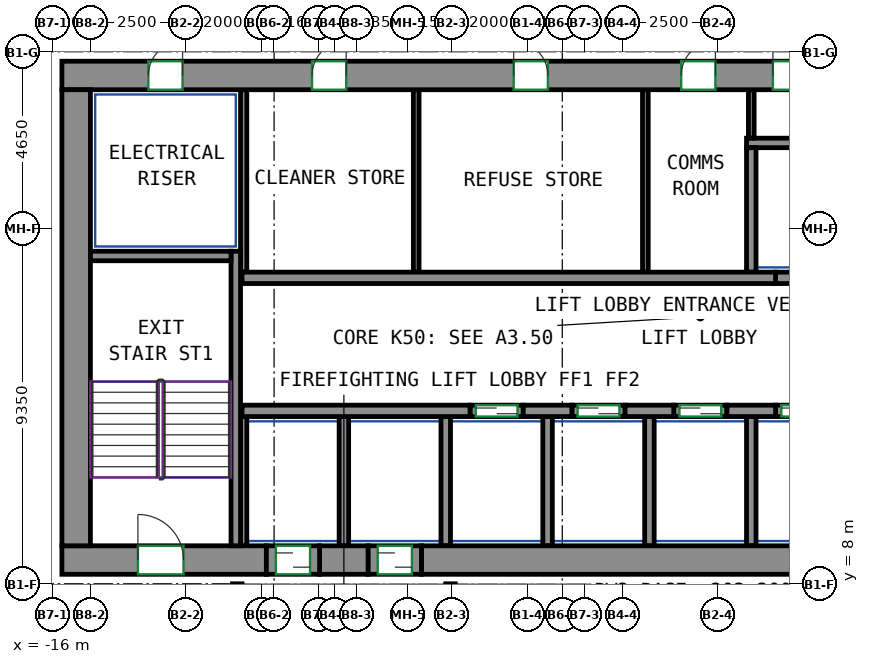
"""IFC4 building model, lengths in metres.
Left out: names, types, materials, properties, quantities, classifications, styles, units other than length and angle.
Written with IfcOpenShell. Run it as: python <this file> out.ifc"""

import sys

from ifc_helpers import new_model, si_unit, direction, frame, frame_2d, origin, place, context, subcontext, project, spatial, rectangle, extrude, source, transform, mapped, element, fill, save


model = new_model("IFC4")
c1 = context("Model", 3, precision=1e-05, world=origin(), true_north=direction((0.0, 1.0)))
c2 = subcontext(c1, "Body", "Model", "MODEL_VIEW")
j1 = project(units=[si_unit("LENGTHUNIT", "METRE"), si_unit("PLANEANGLEUNIT", "RADIAN")], contexts=[c1])
p1 = place(None, origin())
s1 = spatial("IfcSite", under=j1, at=p1, CompositionType="ELEMENT")
p2 = place(p1, origin())
s2 = spatial("IfcBuilding", under=s1, at=p2, CompositionType="ELEMENT")
p3 = place(p2, frame((0.0, 0.0, 203.3)))
s3 = spatial("IfcBuildingStorey", under=s2, at=p3, CompositionType="ELEMENT", Elevation=203.3)
m1 = source(origin(), c2, "Body", "SweptSolid", [
    extrude(rectangle(XDim=5.38, YDim=0.75, at=frame_2d((2.69, 0.0))), origin(), (0.0, 0.0, 1.0), 3.12),
])
p4 = place(p3, frame((-15.75, 8.625, 0.0), z_axis=(0.0, 0.0, 1.0), x_axis=(1.0, 0.0, 0.0)))
e1 = element("IfcWall", 1, at=p4, inside=s3, PredefinedType="SHEAR", context=c2, shape_type="MappedRepresentation", body=[
    mapped(m1, transform((0.0, 0.0, 0.0))),
])
p5 = place(p4, frame((2.0, 0.0, 0.0)))
e2 = element("IfcOpeningElement", 2, at=p5, cuts=e1, PredefinedType="OPENING", context=c2, shape_type="SweptSolid", body=[
    extrude(rectangle(XDim=1.2, YDim=2.1, at=frame_2d((0.6, 1.05))), frame((0.0, 0.385, 0.0), z_axis=(0.0, -1.0, 0.0), x_axis=(1.0, 0.0, 0.0)), (0.0, 0.0, 1.0), 0.77),
])
m2 = source(origin(), c2, "Body", "SweptSolid", [
    extrude(rectangle(XDim=1.28, YDim=0.75, at=frame_2d((0.64, 0.0))), origin(), (0.0, 0.0, 1.0), 3.12),
])
p6 = place(p3, frame((-8.97, 8.625, 0.0), z_axis=(0.0, 0.0, 1.0), x_axis=(1.0, 0.0, 0.0)))
e3 = element("IfcWall", 3, at=p6, inside=s3, PredefinedType="SHEAR", context=c2, shape_type="MappedRepresentation", body=[
    mapped(m2, transform((0.0, 0.0, 0.0))),
])
m3 = source(origin(), c2, "Body", "SweptSolid", [
    extrude(rectangle(XDim=14.18, YDim=0.75, at=frame_2d((7.09, 0.0))), origin(), (0.0, 0.0, 1.0), 3.12),
])
p7 = place(p3, frame((-6.29, 8.625, 0.0), z_axis=(0.0, 0.0, 1.0), x_axis=(1.0, 0.0, 0.0)))
e4 = element("IfcWall", 4, at=p7, inside=s3, PredefinedType="SHEAR", context=c2, shape_type="MappedRepresentation", body=[
    mapped(m3, transform((0.0, 0.0, 0.0))),
])
m4 = source(origin(), c2, "Body", "SweptSolid", [
    extrude(rectangle(XDim=33.6, YDim=0.75, at=frame_2d((16.8, 0.0))), origin(), (0.0, 0.0, 1.0), 3.12),
])
p8 = place(p3, frame((-15.75, 21.375, 0.0), z_axis=(0.0, 0.0, 1.0), x_axis=(1.0, 0.0, 0.0)))
e5 = element("IfcWall", 5, at=p8, inside=s3, PredefinedType="SHEAR", context=c2, shape_type="MappedRepresentation", body=[
    mapped(m4, transform((0.0, 0.0, 0.0))),
])
p9 = place(p8, frame((6.581, 0.0, 0.0)))
e6 = element("IfcOpeningElement", 6, at=p9, cuts=e5, PredefinedType="OPENING", context=c2, shape_type="SweptSolid", body=[
    extrude(rectangle(XDim=0.9, YDim=2.1, at=frame_2d((0.45, 1.05))), frame((0.0, 0.385, 0.0), z_axis=(0.0, -1.0, 0.0), x_axis=(1.0, 0.0, 0.0)), (0.0, 0.0, 1.0), 0.77),
])
p10 = place(p8, frame((11.888, 0.0, 0.0)))
e7 = element("IfcOpeningElement", 7, at=p10, cuts=e5, PredefinedType="OPENING", context=c2, shape_type="SweptSolid", body=[
    extrude(rectangle(XDim=0.9, YDim=2.1, at=frame_2d((0.45, 1.05))), frame((0.0, 0.385, 0.0), z_axis=(0.0, -1.0, 0.0), x_axis=(1.0, 0.0, 0.0)), (0.0, 0.0, 1.0), 0.77),
])
p11 = place(p8, frame((16.296, 0.0, 0.0)))
e8 = element("IfcOpeningElement", 8, at=p11, cuts=e5, PredefinedType="OPENING", context=c2, shape_type="SweptSolid", body=[
    extrude(rectangle(XDim=0.9, YDim=2.1, at=frame_2d((0.45, 1.05))), frame((0.0, 0.385, 0.0), z_axis=(0.0, -1.0, 0.0), x_axis=(1.0, 0.0, 0.0)), (0.0, 0.0, 1.0), 0.77),
])
p12 = place(p8, frame((18.708, 0.0, 0.0)))
e9 = element("IfcOpeningElement", 9, at=p12, cuts=e5, PredefinedType="OPENING", context=c2, shape_type="SweptSolid", body=[
    extrude(rectangle(XDim=0.9, YDim=2.1, at=frame_2d((0.45, 1.05))), frame((0.0, 0.385, 0.0), z_axis=(0.0, -1.0, 0.0), x_axis=(1.0, 0.0, 0.0)), (0.0, 0.0, 1.0), 0.77),
])
p13 = place(p8, frame((21.536, 0.0, 0.0)))
e10 = element("IfcOpeningElement", 10, at=p13, cuts=e5, PredefinedType="OPENING", context=c2, shape_type="SweptSolid", body=[
    extrude(rectangle(XDim=0.9, YDim=2.1, at=frame_2d((0.45, 1.05))), frame((0.0, 0.385, 0.0), z_axis=(0.0, -1.0, 0.0), x_axis=(1.0, 0.0, 0.0)), (0.0, 0.0, 1.0), 0.77),
])
p14 = place(p8, frame((25.877, 0.0, 0.0)))
e11 = element("IfcOpeningElement", 11, at=p14, cuts=e5, PredefinedType="OPENING", context=c2, shape_type="SweptSolid", body=[
    extrude(rectangle(XDim=0.9, YDim=2.1, at=frame_2d((0.45, 1.05))), frame((0.0, 0.385, 0.0), z_axis=(0.0, -1.0, 0.0), x_axis=(1.0, 0.0, 0.0)), (0.0, 0.0, 1.0), 0.77),
])
p15 = place(p8, frame((2.275, 0.0, 0.0)))
e12 = element("IfcOpeningElement", 12, at=p15, cuts=e5, PredefinedType="OPENING", context=c2, shape_type="SweptSolid", body=[
    extrude(rectangle(XDim=0.9, YDim=2.1, at=frame_2d((0.45, 1.05))), frame((0.0, 0.385, 0.0), z_axis=(0.0, -1.0, 0.0), x_axis=(1.0, 0.0, 0.0)), (0.0, 0.0, 1.0), 0.77),
])
p16 = place(p8, frame((30.425, 0.0, 0.0)))
e13 = element("IfcOpeningElement", 13, at=p16, cuts=e5, PredefinedType="OPENING", context=c2, shape_type="SweptSolid", body=[
    extrude(rectangle(XDim=0.9, YDim=2.1, at=frame_2d((0.45, 1.05))), frame((0.0, 0.385, 0.0), z_axis=(0.0, -1.0, 0.0), x_axis=(1.0, 0.0, 0.0)), (0.0, 0.0, 1.0), 0.77),
])
m5 = source(origin(), c2, "Body", "SweptSolid", [
    extrude(rectangle(XDim=12.0, YDim=0.75, at=frame_2d((6.0, 0.0))), origin(), (0.0, 0.0, 1.0), 3.12),
])
p17 = place(p3, frame((-15.375, 9.0, 0.0), z_axis=(0.0, 0.0, 1.0), x_axis=(0.0, 1.0, 0.0)))
e14 = element("IfcWall", 14, at=p17, inside=s3, PredefinedType="SHEAR", context=c2, shape_type="MappedRepresentation", body=[
    mapped(m5, transform((0.0, 0.0, 0.0))),
])
m6 = source(origin(), c2, "Body", "SweptSolid", [
    extrude(rectangle(XDim=7.75, YDim=0.25, at=frame_2d((3.875, 0.0))), origin(), (0.0, 0.0, 1.0), 3.12),
])
p18 = place(p3, frame((-11.175, 9.0, 0.0), z_axis=(0.0, 0.0, 1.0), x_axis=(0.0, 1.0, 0.0)))
e15 = element("IfcWall", 15, at=p18, inside=s3, PredefinedType="SHEAR", context=c2, shape_type="MappedRepresentation", body=[
    mapped(m6, transform((0.0, 0.0, 0.0))),
])
m7 = source(origin(), c2, "Body", "SweptSolid", [
    extrude(rectangle(XDim=3.7, YDim=0.25, at=frame_2d((1.85, 0.0))), origin(), (0.0, 0.0, 1.0), 3.12),
])
p19 = place(p3, frame((-15.0, 16.625, 0.0), z_axis=(0.0, 0.0, 1.0), x_axis=(1.0, 0.0, 0.0)))
e16 = element("IfcWall", 16, at=p19, inside=s3, PredefinedType="SHEAR", context=c2, shape_type="MappedRepresentation", body=[
    mapped(m7, transform((0.0, 0.0, 0.0))),
])
m8 = source(origin(), c2, "Body", "SweptSolid", [
    extrude(rectangle(XDim=6.0, YDim=0.3, at=frame_2d((3.0, 0.0))), origin(), (0.0, 0.0, 1.0), 3.12),
])
p20 = place(p3, frame((-11.01, 12.55, 0.0), z_axis=(0.0, 0.0, 1.0), x_axis=(1.0, 0.0, 0.0)))
e17 = element("IfcWall", 17, at=p20, inside=s3, PredefinedType="SHEAR", context=c2, shape_type="MappedRepresentation", body=[
    mapped(m8, transform((0.0, 0.0, 0.0))),
])
m9 = source(origin(), c2, "Body", "SweptSolid", [
    extrude(rectangle(XDim=1.28, YDim=0.3, at=frame_2d((0.64, 0.0))), origin(), (0.0, 0.0, 1.0), 3.12),
])
for number, where, z_axis, x_axis in (
    (18, (-3.61, 12.55, 0.0), (0.0, 0.0, 1.0), (1.0, 0.0, 0.0)),
    (19, (-0.93, 12.55, 0.0), (0.0, 0.0, 1.0), (1.0, 0.0, 0.0)),
    (20, (1.75, 12.55, 0.0), (0.0, 0.0, 1.0), (1.0, 0.0, 0.0)),
):
    element("IfcWall", number, at=place(p3, frame(where, z_axis=z_axis, x_axis=x_axis)), inside=s3, PredefinedType="SHEAR", context=c2, shape_type="MappedRepresentation", body=[
        mapped(m9, transform((0.0, 0.0, 0.0))),
    ])
m10 = source(origin(), c2, "Body", "SweptSolid", [
    extrude(rectangle(XDim=14.04, YDim=0.3, at=frame_2d((7.02, 0.0))), origin(), (0.0, 0.0, 1.0), 3.12),
])
p21 = place(p3, frame((-11.01, 16.05, 0.0), z_axis=(0.0, 0.0, 1.0), x_axis=(1.0, 0.0, 0.0)))
e21 = element("IfcWall", 21, at=p21, inside=s3, PredefinedType="SHEAR", context=c2, shape_type="MappedRepresentation", body=[
    mapped(m10, transform((0.0, 0.0, 0.0))),
])
m11 = source(origin(), c2, "Body", "SweptSolid", [
    extrude(rectangle(XDim=1.4, YDim=0.3, at=frame_2d((0.7, 0.0))), origin(), (0.0, 0.0, 1.0), 3.12),
])
p22 = place(p3, frame((-5.01, 12.55, 0.0), z_axis=(0.0, 0.0, 1.0), x_axis=(1.0, 0.0, 0.0)))
e22 = element("IfcWall", 22, at=p22, inside=s3, PredefinedType="PARTITIONING", context=c2, shape_type="MappedRepresentation", body=[
    mapped(m11, transform((0.0, 0.0, 0.0))),
])
p23 = place(p22, frame((0.15, 0.0, 0.0)))
e23 = element("IfcOpeningElement", 23, at=p23, cuts=e22, PredefinedType="OPENING", context=c2, shape_type="SweptSolid", body=[
    extrude(rectangle(XDim=1.1, YDim=2.1, at=frame_2d((0.55, 1.05))), frame((0.0, 0.16, 0.0), z_axis=(0.0, -1.0, 0.0), x_axis=(1.0, 0.0, 0.0)), (0.0, 0.0, 1.0), 0.32),
])
m12 = source(origin(), c2, "Body", "SweptSolid", [
    extrude(rectangle(XDim=1.4, YDim=0.3, at=frame_2d((0.7, 0.0))), origin(), (0.0, 0.0, 1.0), 3.12),
])
p24 = place(p3, frame((-2.33, 12.55, 0.0), z_axis=(0.0, 0.0, 1.0), x_axis=(1.0, 0.0, 0.0)))
e24 = element("IfcWall", 24, at=p24, inside=s3, PredefinedType="PARTITIONING", context=c2, shape_type="MappedRepresentation", body=[
    mapped(m12, transform((0.0, 0.0, 0.0))),
])
p25 = place(p24, frame((0.15, 0.0, 0.0)))
e25 = element("IfcOpeningElement", 25, at=p25, cuts=e24, PredefinedType="OPENING", context=c2, shape_type="SweptSolid", body=[
    extrude(rectangle(XDim=1.1, YDim=2.1, at=frame_2d((0.55, 1.05))), frame((0.0, 0.16, 0.0), z_axis=(0.0, -1.0, 0.0), x_axis=(1.0, 0.0, 0.0)), (0.0, 0.0, 1.0), 0.32),
])
p26 = place(p3, frame((0.35, 12.55, 0.0), z_axis=(0.0, 0.0, 1.0), x_axis=(1.0, 0.0, 0.0)))
e26 = element("IfcWall", 26, at=p26, inside=s3, PredefinedType="PARTITIONING", context=c2, shape_type="MappedRepresentation", body=[
    mapped(m11, transform((0.0, 0.0, 0.0))),
])
p27 = place(p26, frame((0.15, 0.0, 0.0)))
e27 = element("IfcOpeningElement", 27, at=p27, cuts=e26, PredefinedType="OPENING", context=c2, shape_type="SweptSolid", body=[
    extrude(rectangle(XDim=1.1, YDim=2.1, at=frame_2d((0.55, 1.05))), frame((0.0, 0.16, 0.0), z_axis=(0.0, -1.0, 0.0), x_axis=(1.0, 0.0, 0.0)), (0.0, 0.0, 1.0), 0.32),
])
p28 = place(p3, frame((3.03, 12.55, 0.0), z_axis=(0.0, 0.0, 1.0), x_axis=(1.0, 0.0, 0.0)))
e28 = element("IfcWall", 28, at=p28, inside=s3, PredefinedType="PARTITIONING", context=c2, shape_type="MappedRepresentation", body=[
    mapped(m11, transform((0.0, 0.0, 0.0))),
])
p29 = place(p28, frame((0.15, 0.0, 0.0)))
e29 = element("IfcOpeningElement", 29, at=p29, cuts=e28, PredefinedType="OPENING", context=c2, shape_type="SweptSolid", body=[
    extrude(rectangle(XDim=1.1, YDim=2.1, at=frame_2d((0.55, 1.05))), frame((0.0, 0.16, 0.0), z_axis=(0.0, -1.0, 0.0), x_axis=(1.0, 0.0, 0.0)), (0.0, 0.0, 1.0), 0.32),
])
p30 = place(p3, frame((3.03, 16.05, 0.0), z_axis=(0.0, 0.0, 1.0), x_axis=(1.0, 0.0, 0.0)))
e30 = element("IfcWall", 30, at=p30, inside=s3, PredefinedType="PARTITIONING", context=c2, shape_type="MappedRepresentation", body=[
    mapped(m11, transform((0.0, 0.0, 0.0))),
])
m13 = source(origin(), c2, "Body", "SweptSolid", [
    extrude(rectangle(XDim=10.97, YDim=0.25, at=frame_2d((5.485, 0.0))), origin(), (0.0, 0.0, 1.0), 3.12),
])
p31 = place(p3, frame((2.265, 19.6, 0.0), z_axis=(0.0, 0.0, 1.0), x_axis=(1.0, 0.0, 0.0)))
e31 = element("IfcWall", 31, at=p31, inside=s3, PredefinedType="PARTITIONING", context=c2, shape_type="MappedRepresentation", body=[
    mapped(m13, transform((0.0, 0.0, 0.0))),
])
m14 = source(origin(), c2, "Body", "SweptSolid", [
    extrude(rectangle(XDim=4.8, YDim=0.165, at=frame_2d((2.4, 0.0))), origin(), (0.0, 0.0, 1.0), 3.12),
])
p32 = place(p3, frame((-10.968, 16.2, 0.0), z_axis=(0.0, 0.0, 1.0), x_axis=(0.0, 1.0, 0.0)))
e32 = element("IfcWall", 32, at=p32, inside=s3, PredefinedType="PARTITIONING", context=c2, shape_type="MappedRepresentation", body=[
    mapped(m14, transform((0.0, 0.0, 0.0))),
])
m15 = source(origin(), c2, "Body", "SweptSolid", [
    extrude(rectangle(XDim=3.275, YDim=0.25, at=frame_2d((1.638, 0.0))), origin(), (0.0, 0.0, 1.0), 3.12),
])
p33 = place(p3, frame((2.39, 16.2, 0.0), z_axis=(0.0, 0.0, 1.0), x_axis=(0.0, 1.0, 0.0)))
e33 = element("IfcWall", 33, at=p33, inside=s3, PredefinedType="PARTITIONING", context=c2, shape_type="MappedRepresentation", body=[
    mapped(m15, transform((0.0, 0.0, 0.0))),
])
m16 = source(origin(), c2, "Body", "SweptSolid", [
    extrude(rectangle(XDim=3.4, YDim=0.25, at=frame_2d((1.7, 0.0))), origin(), (0.0, 0.0, 1.0), 3.12),
])
for number, where, z_axis, x_axis in (
    (34, (2.39, 9.0, 0.0), (0.0, 0.0, 1.0), (0.0, 1.0, 0.0)),
    (35, (-0.29, 9.0, 0.0), (0.0, 0.0, 1.0), (0.0, 1.0, 0.0)),
):
    element("IfcWall", number, at=place(p3, frame(where, z_axis=z_axis, x_axis=x_axis)), inside=s3, PredefinedType="PARTITIONING", context=c2, shape_type="MappedRepresentation", body=[
        mapped(m16, transform((0.0, 0.0, 0.0))),
    ])
m17 = source(origin(), c2, "Body", "SweptSolid", [
    extrude(rectangle(XDim=3.4, YDim=0.165, at=frame_2d((1.7, 0.0))), origin(), (0.0, 0.0, 1.0), 3.12),
])
p34 = place(p3, frame((-10.968, 9.0, 0.0), z_axis=(0.0, 0.0, 1.0), x_axis=(0.0, 1.0, 0.0)))
e36 = element("IfcWall", 36, at=p34, inside=s3, PredefinedType="PARTITIONING", context=c2, shape_type="MappedRepresentation", body=[
    mapped(m17, transform((0.0, 0.0, 0.0))),
])
for number, where, z_axis, x_axis in (
    (37, (-2.97, 9.0, 0.0), (0.0, 0.0, 1.0), (0.0, 1.0, 0.0)),
    (38, (-5.65, 9.0, 0.0), (0.0, 0.0, 1.0), (0.0, 1.0, 0.0)),
    (39, (-8.33, 9.0, 0.0), (0.0, 0.0, 1.0), (0.0, 1.0, 0.0)),
):
    element("IfcWall", number, at=place(p3, frame(where, z_axis=z_axis, x_axis=x_axis)), inside=s3, PredefinedType="PARTITIONING", context=c2, shape_type="MappedRepresentation", body=[
        mapped(m16, transform((0.0, 0.0, 0.0))),
    ])
m18 = source(origin(), c2, "Body", "SweptSolid", [
    extrude(rectangle(XDim=4.8, YDim=0.15, at=frame_2d((2.4, 0.0))), origin(), (0.0, 0.0, 1.0), 3.12),
])
for number, where, z_axis, x_axis in (
    (40, (-6.427, 16.2, 0.0), (0.0, 0.0, 1.0), (0.0, 1.0, 0.0)),
    (41, (-0.397, 16.2, 0.0), (0.0, 0.0, 1.0), (0.0, 1.0, 0.0)),
):
    element("IfcWall", number, at=place(p3, frame(where, z_axis=z_axis, x_axis=x_axis)), inside=s3, PredefinedType="PARTITIONING", context=c2, shape_type="MappedRepresentation", body=[
        mapped(m18, transform((0.0, 0.0, 0.0))),
    ])
m19 = source(origin(), c2, "Body", "SweptSolid", [
    extrude(rectangle(XDim=1.275, YDim=0.15, at=frame_2d((0.637, 0.0))), origin(), (0.0, 0.0, 1.0), 3.12),
])
p35 = place(p3, frame((2.39, 19.725, 0.0), z_axis=(0.0, 0.0, 1.0), x_axis=(0.0, 1.0, 0.0)))
e42 = element("IfcWall", 42, at=p35, inside=s3, PredefinedType="PARTITIONING", context=c2, shape_type="MappedRepresentation", body=[
    mapped(m19, transform((0.0, 0.0, 0.0))),
])
m20 = source(origin(), c2, "Body", "SweptSolid", [
    extrude(rectangle(XDim=1.4, YDim=0.75, at=frame_2d((0.7, 0.0))), origin(), (0.0, 0.0, 1.0), 2.7),
])
p36 = place(p3, frame((-10.37, 8.625, 0.0), z_axis=(0.0, 0.0, 1.0), x_axis=(1.0, 0.0, 0.0)))
e43 = element("IfcWall", 43, at=p36, inside=s3, PredefinedType="PARTITIONING", context=c2, shape_type="MappedRepresentation", body=[
    mapped(m20, transform((0.0, 0.0, 0.0))),
])
p37 = place(p36, frame((0.25, 0.0, 0.0)))
e44 = element("IfcOpeningElement", 44, at=p37, cuts=e43, PredefinedType="OPENING", context=c2, shape_type="SweptSolid", body=[
    extrude(rectangle(XDim=0.9, YDim=2.1, at=frame_2d((0.45, 1.05))), frame((0.0, 0.385, 0.0), z_axis=(0.0, -1.0, 0.0), x_axis=(1.0, 0.0, 0.0)), (0.0, 0.0, 1.0), 0.77),
])
m21 = source(origin(), c2, "Body", "SweptSolid", [
    extrude(rectangle(XDim=1.4, YDim=0.75, at=frame_2d((0.7, 0.0))), origin(), (0.0, 0.0, 1.0), 2.7),
])
p38 = place(p3, frame((-7.69, 8.625, 0.0), z_axis=(0.0, 0.0, 1.0), x_axis=(1.0, 0.0, 0.0)))
e45 = element("IfcWall", 45, at=p38, inside=s3, PredefinedType="PARTITIONING", context=c2, shape_type="MappedRepresentation", body=[
    mapped(m21, transform((0.0, 0.0, 0.0))),
])
p39 = place(p38, frame((0.25, 0.0, 0.0)))
e46 = element("IfcOpeningElement", 46, at=p39, cuts=e45, PredefinedType="OPENING", context=c2, shape_type="SweptSolid", body=[
    extrude(rectangle(XDim=0.9, YDim=2.1, at=frame_2d((0.45, 1.05))), frame((0.0, 0.385, 0.0), z_axis=(0.0, -1.0, 0.0), x_axis=(1.0, 0.0, 0.0)), (0.0, 0.0, 1.0), 0.77),
])
p40 = place(p37, origin())
e47 = element("IfcDoor", 47, at=p40, inside=s3, OperationType="SLIDING_TO_LEFT", PredefinedType="DOOR", context=c2, shape_type="SweptSolid", body=[
    extrude(rectangle(XDim=0.9, YDim=2.1, at=frame_2d((0.45, 1.05))), frame((0.0, 0.28, 0.0), z_axis=(0.0, -1.0, 0.0), x_axis=(1.0, 0.0, 0.0)), (0.0, 0.0, 1.0), 0.05),
])
fill(e44, e47)
p41 = place(p39, origin())
e48 = element("IfcDoor", 48, at=p41, inside=s3, OperationType="SLIDING_TO_RIGHT", PredefinedType="DOOR", context=c2, shape_type="SweptSolid", body=[
    extrude(rectangle(XDim=0.9, YDim=2.1, at=frame_2d((0.45, 1.05))), frame((0.0, 0.28, 0.0), z_axis=(0.0, -1.0, 0.0), x_axis=(1.0, 0.0, 0.0)), (0.0, 0.0, 1.0), 0.05),
])
fill(e46, e48)
p42 = place(p23, origin())
e49 = element("IfcDoor", 49, at=p42, inside=s3, OperationType="DOUBLE_DOOR_SLIDING", PredefinedType="DOOR", context=c2, shape_type="SweptSolid", body=[
    extrude(rectangle(XDim=1.1, YDim=2.1, at=frame_2d((0.55, 1.05))), frame((0.0, 0.025, 0.0), z_axis=(0.0, -1.0, 0.0), x_axis=(1.0, 0.0, 0.0)), (0.0, 0.0, 1.0), 0.05),
])
fill(e23, e49)
p43 = place(p25, origin())
e50 = element("IfcDoor", 50, at=p43, inside=s3, OperationType="DOUBLE_DOOR_SLIDING", PredefinedType="DOOR", context=c2, shape_type="SweptSolid", body=[
    extrude(rectangle(XDim=1.1, YDim=2.1, at=frame_2d((0.55, 1.05))), frame((0.0, 0.025, 0.0), z_axis=(0.0, -1.0, 0.0), x_axis=(1.0, 0.0, 0.0)), (0.0, 0.0, 1.0), 0.05),
])
fill(e25, e50)
p44 = place(p27, origin())
e51 = element("IfcDoor", 51, at=p44, inside=s3, OperationType="DOUBLE_DOOR_SLIDING", PredefinedType="DOOR", context=c2, shape_type="SweptSolid", body=[
    extrude(rectangle(XDim=1.1, YDim=2.1, at=frame_2d((0.55, 1.05))), frame((0.0, 0.025, 0.0), z_axis=(0.0, -1.0, 0.0), x_axis=(1.0, 0.0, 0.0)), (0.0, 0.0, 1.0), 0.05),
])
fill(e27, e51)
p45 = place(p29, origin())
e52 = element("IfcDoor", 52, at=p45, inside=s3, OperationType="DOUBLE_DOOR_SLIDING", PredefinedType="DOOR", context=c2, shape_type="SweptSolid", body=[
    extrude(rectangle(XDim=1.1, YDim=2.1, at=frame_2d((0.55, 1.05))), frame((0.0, 0.025, 0.0), z_axis=(0.0, -1.0, 0.0), x_axis=(1.0, 0.0, 0.0)), (0.0, 0.0, 1.0), 0.05),
])
fill(e29, e52)
p46 = place(p9, origin())
e53 = element("IfcDoor", 53, at=p46, inside=s3, OperationType="SINGLE_SWING_RIGHT", PredefinedType="DOOR", context=c2, shape_type="SweptSolid", body=[
    extrude(rectangle(XDim=0.9, YDim=2.1, at=frame_2d((0.45, 1.05))), frame((0.0, -0.23, 0.0), z_axis=(0.0, -1.0, 0.0), x_axis=(1.0, 0.0, 0.0)), (0.0, 0.0, 1.0), 0.05),
])
fill(e6, e53)
p47 = place(p10, origin())
e54 = element("IfcDoor", 54, at=p47, inside=s3, OperationType="SINGLE_SWING_LEFT", PredefinedType="DOOR", context=c2, shape_type="SweptSolid", body=[
    extrude(rectangle(XDim=0.9, YDim=2.1, at=frame_2d((0.45, 1.05))), frame((0.0, -0.23, 0.0), z_axis=(0.0, -1.0, 0.0), x_axis=(1.0, 0.0, 0.0)), (0.0, 0.0, 1.0), 0.05),
])
fill(e7, e54)
p48 = place(p11, origin())
e55 = element("IfcDoor", 55, at=p48, inside=s3, OperationType="SINGLE_SWING_RIGHT", PredefinedType="DOOR", context=c2, shape_type="SweptSolid", body=[
    extrude(rectangle(XDim=0.9, YDim=2.1, at=frame_2d((0.45, 1.05))), frame((0.0, -0.23, 0.0), z_axis=(0.0, -1.0, 0.0), x_axis=(1.0, 0.0, 0.0)), (0.0, 0.0, 1.0), 0.05),
])
fill(e8, e55)
p49 = place(p12, origin())
e56 = element("IfcDoor", 56, at=p49, inside=s3, OperationType="SINGLE_SWING_LEFT", PredefinedType="DOOR", context=c2, shape_type="SweptSolid", body=[
    extrude(rectangle(XDim=0.9, YDim=2.1, at=frame_2d((0.45, 1.05))), frame((0.0, -0.23, 0.0), z_axis=(0.0, -1.0, 0.0), x_axis=(1.0, 0.0, 0.0)), (0.0, 0.0, 1.0), 0.05),
])
fill(e9, e56)
p50 = place(p15, origin())
e57 = element("IfcDoor", 57, at=p50, inside=s3, OperationType="SINGLE_SWING_RIGHT", PredefinedType="DOOR", context=c2, shape_type="SweptSolid", body=[
    extrude(rectangle(XDim=0.9, YDim=2.1, at=frame_2d((0.45, 1.05))), frame((0.0, -0.23, 0.0), z_axis=(0.0, -1.0, 0.0), x_axis=(1.0, 0.0, 0.0)), (0.0, 0.0, 1.0), 0.05),
])
fill(e12, e57)
p51 = place(p5, origin())
e58 = element("IfcDoor", 58, at=p51, inside=s3, OperationType="DOUBLE_DOOR_SINGLE_SWING", PredefinedType="DOOR", context=c2, shape_type="SweptSolid", body=[
    extrude(rectangle(XDim=1.2, YDim=2.1, at=frame_2d((0.6, 1.05))), frame((0.0, 0.28, 0.0), z_axis=(0.0, -1.0, 0.0), x_axis=(1.0, 0.0, 0.0)), (0.0, 0.0, 1.0), 0.05),
])
fill(e2, e58)
save(model, sys.argv[1])
